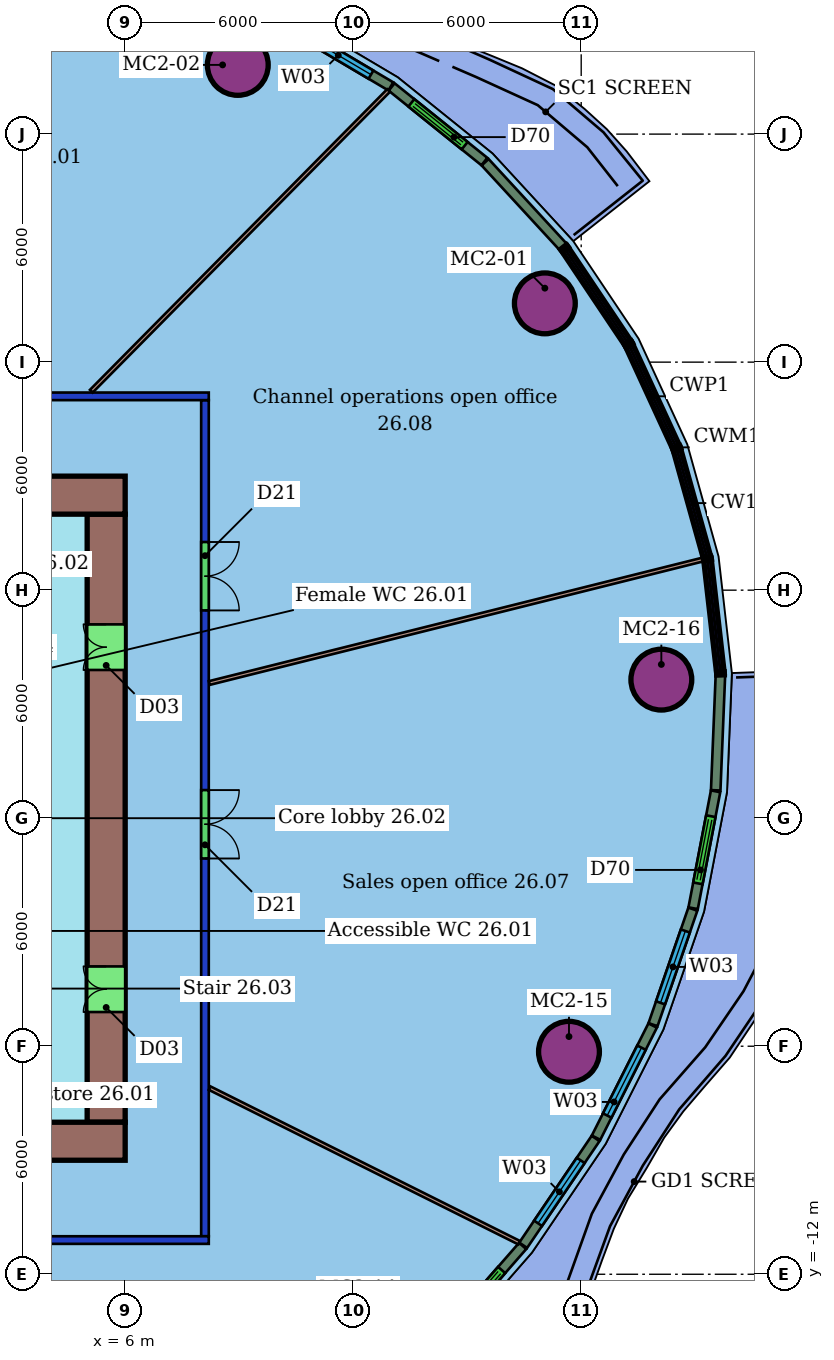
"""IFC4 building model, lengths in metres.
Left out: names, types, materials, properties, quantities, classifications, styles, units other than length and angle.
Written with IfcOpenShell. Run it as: python <this file> out.ifc"""

import sys

from ifc_helpers import new_model, si_unit, direction, frame, frame_2d, origin, origin_2d, place, context, subcontext, project, spatial, rectangle, hollow_circle, extrude, element, fill, save


model = new_model("IFC4")
c1 = context("Model", 3, precision=1e-05, world=origin(), true_north=direction((0.0, 1.0)))
c2 = subcontext(c1, "Body", "Model", "MODEL_VIEW")
j1 = project(units=[si_unit("LENGTHUNIT", "METRE"), si_unit("PLANEANGLEUNIT", "RADIAN")], contexts=[c1])
p1 = place(None, origin())
s1 = spatial("IfcSite", under=j1, at=p1, CompositionType="ELEMENT")
p2 = place(p1, origin())
s2 = spatial("IfcBuilding", under=s1, at=p2, CompositionType="ELEMENT")
p3 = place(p2, frame((0.0, 0.0, 113.8)))
s3 = spatial("IfcBuildingStorey", under=s2, at=p3, CompositionType="ELEMENT", Elevation=113.8)
for number, where, z_axis, x_axis in (
    (1, (17.043, 13.547, 0.0), (0.0, 0.0, 1.0), (1.0, 0.0, 0.0)),
    (2, (8.963, 19.821, 0.0), (0.0, 0.0, 1.0), (1.0, 0.0, 0.0)),
    (3, (17.679, -6.146, 0.0), (0.0, 0.0, 1.0), (1.0, 0.0, 0.0)),
    (4, (20.109, 3.646, 0.0), (0.0, 0.0, 1.0), (1.0, 0.0, 0.0)),
):
    element("IfcColumn", number, at=place(p3, frame(where, z_axis=z_axis, x_axis=x_axis)), inside=s3, PredefinedType="COLUMN", context=c2, shape_type="SweptSolid", body=[
        extrude(hollow_circle(Radius=0.8, WallThickness=0.055, at=origin_2d()), origin(), (0.0, 0.0, 1.0), 3.45),
    ])
p4 = place(p3, frame((8.2, -11.1, 0.0), z_axis=(0.0, 0.0, 1.0), x_axis=(-1.0, 0.0, 0.0)))
e5 = element("IfcWall", 5, at=p4, inside=s3, PredefinedType="PARTITIONING", context=c2, shape_type="SweptSolid", body=[
    extrude(rectangle(XDim=28.4, YDim=0.2, at=frame_2d((14.2, 0.0))), origin(), (0.0, 0.0, 1.0), 3.0),
])
p5 = place(p4, frame((19.015, 0.0, 0.0)))
e6 = element("IfcOpeningElement", 6, at=p5, cuts=e5, PredefinedType="OPENING", context=c2, shape_type="SweptSolid", body=[
    extrude(rectangle(XDim=1.8, YDim=2.1, at=frame_2d((0.9, 1.05))), frame((0.0, 0.11, 0.0), z_axis=(0.0, -1.0, 0.0), x_axis=(1.0, 0.0, 0.0)), (0.0, 0.0, 1.0), 0.22),
])
p6 = place(p4, frame((9.455, 0.0, 0.0)))
e7 = element("IfcOpeningElement", 7, at=p6, cuts=e5, PredefinedType="OPENING", context=c2, shape_type="SweptSolid", body=[
    extrude(rectangle(XDim=1.8, YDim=2.1, at=frame_2d((0.9, 1.05))), frame((0.0, 0.11, 0.0), z_axis=(0.0, -1.0, 0.0), x_axis=(1.0, 0.0, 0.0)), (0.0, 0.0, 1.0), 0.22),
])
p7 = place(p3, frame((-20.2, 11.1, 0.0), z_axis=(0.0, 0.0, 1.0), x_axis=(1.0, 0.0, 0.0)))
e8 = element("IfcWall", 8, at=p7, inside=s3, PredefinedType="PARTITIONING", context=c2, shape_type="SweptSolid", body=[
    extrude(rectangle(XDim=28.4, YDim=0.2, at=frame_2d((14.2, 0.0))), origin(), (0.0, 0.0, 1.0), 3.0),
])
p8 = place(p7, frame((20.417, 0.0, 0.0)))
e9 = element("IfcOpeningElement", 9, at=p8, cuts=e8, PredefinedType="OPENING", context=c2, shape_type="SweptSolid", body=[
    extrude(rectangle(XDim=1.8, YDim=2.1, at=frame_2d((0.9, 1.05))), frame((0.0, 0.11, 0.0), z_axis=(0.0, -1.0, 0.0), x_axis=(1.0, 0.0, 0.0)), (0.0, 0.0, 1.0), 0.22),
])
p9 = place(p7, frame((7.743, 0.0, 0.0)))
e10 = element("IfcOpeningElement", 10, at=p9, cuts=e8, PredefinedType="OPENING", context=c2, shape_type="SweptSolid", body=[
    extrude(rectangle(XDim=1.0, YDim=2.1, at=frame_2d((0.5, 1.05))), frame((0.0, 0.11, 0.0), z_axis=(0.0, -1.0, 0.0), x_axis=(1.0, 0.0, 0.0)), (0.0, 0.0, 1.0), 0.22),
])
p10 = place(p7, frame((2.867, 0.0, 0.0)))
e11 = element("IfcOpeningElement", 11, at=p10, cuts=e8, PredefinedType="OPENING", context=c2, shape_type="SweptSolid", body=[
    extrude(rectangle(XDim=1.0, YDim=2.4, at=frame_2d((0.5, 1.2))), frame((0.0, 0.11, 0.0), z_axis=(0.0, -1.0, 0.0), x_axis=(1.0, 0.0, 0.0)), (0.0, 0.0, 1.0), 0.22),
])
p11 = place(p3, frame((8.1, 11.0, 0.0), z_axis=(0.0, 0.0, 1.0), x_axis=(0.0, -1.0, 0.0)))
e12 = element("IfcWall", 12, at=p11, inside=s3, PredefinedType="PARTITIONING", context=c2, shape_type="SweptSolid", body=[
    extrude(rectangle(XDim=22.0, YDim=0.2, at=frame_2d((11.0, 0.0))), origin(), (0.0, 0.0, 1.0), 3.0),
])
p12 = place(p11, frame((10.26, 0.0, 0.0)))
e13 = element("IfcOpeningElement", 13, at=p12, cuts=e12, PredefinedType="OPENING", context=c2, shape_type="SweptSolid", body=[
    extrude(rectangle(XDim=1.8, YDim=2.1, at=frame_2d((0.9, 1.05))), frame((0.0, 0.11, 0.0), z_axis=(0.0, -1.0, 0.0), x_axis=(1.0, 0.0, 0.0)), (0.0, 0.0, 1.0), 0.22),
])
p13 = place(p11, frame((3.733, 0.0, 0.0)))
e14 = element("IfcOpeningElement", 14, at=p13, cuts=e12, PredefinedType="OPENING", context=c2, shape_type="SweptSolid", body=[
    extrude(rectangle(XDim=1.8, YDim=2.1, at=frame_2d((0.9, 1.05))), frame((0.0, 0.11, 0.0), z_axis=(0.0, -1.0, 0.0), x_axis=(1.0, 0.0, 0.0)), (0.0, 0.0, 1.0), 0.22),
])
p14 = place(p3, frame((12.93, 19.146, 0.0), z_axis=(0.0, 0.0, 1.0), x_axis=(-0.703090382433, -0.711100495099, 0.0)))
e15 = element("IfcWall", 15, at=p14, inside=s3, PredefinedType="PARTITIONING", context=c2, shape_type="SweptSolid", body=[
    extrude(rectangle(XDim=11.125, YDim=0.1, at=frame_2d((5.562, 0.0))), origin(), (0.0, 0.0, 1.0), 3.45),
])
p15 = place(p3, frame((16.368, -11.17, 0.0), z_axis=(0.0, 0.0, 1.0), x_axis=(-0.894652322712, 0.446763048457, 0.0)))
e16 = element("IfcWall", 16, at=p15, inside=s3, PredefinedType="PARTITIONING", context=c2, shape_type="SweptSolid", body=[
    extrude(rectangle(XDim=9.105, YDim=0.1, at=frame_2d((4.552, 0.0))), origin(), (0.0, 0.0, 1.0), 3.45),
])
p16 = place(p3, frame((21.198, 6.805, 0.0), z_axis=(0.0, 0.0, 1.0), x_axis=(-0.970095274977, -0.242724447608, 0.0)))
e17 = element("IfcWall", 17, at=p16, inside=s3, PredefinedType="PARTITIONING", context=c2, shape_type="SweptSolid", body=[
    extrude(rectangle(XDim=13.386, YDim=0.1, at=frame_2d((6.693, 0.0))), origin(), (0.0, 0.0, 1.0), 3.45),
])
p17 = place(p3, frame((17.52, 15.038, 0.0), z_axis=(0.0, 0.0, 1.0), x_axis=(-0.677632184293, 0.735400994567, 0.0)))
e18 = element("IfcWall", 18, at=p17, inside=s3, PredefinedType="SOLIDWALL", context=c2, shape_type="SweptSolid", body=[
    extrude(rectangle(XDim=3.022, YDim=0.25, at=frame_2d((1.511, 0.0))), origin(), (0.0, 0.0, 1.0), 3.05),
])
p18 = place(p3, frame((15.453, 17.278, 0.0), z_axis=(0.0, 0.0, 1.0), x_axis=(-0.779353281229, 0.626584761256, 0.0)))
e19 = element("IfcWall", 19, at=p18, inside=s3, PredefinedType="SOLIDWALL", context=c2, shape_type="SweptSolid", body=[
    extrude(rectangle(XDim=3.132, YDim=0.25, at=frame_2d((1.566, 0.0))), origin(), (0.0, 0.0, 1.0), 3.05),
])
p19 = place(p18, frame((0.666, 0.0, 0.0)))
e20 = element("IfcOpeningElement", 20, at=p19, cuts=e19, PredefinedType="OPENING", context=c2, shape_type="SweptSolid", body=[
    extrude(rectangle(XDim=1.8, YDim=2.4, at=frame_2d((0.9, 1.2))), frame((0.0, 0.135, 0.0), z_axis=(0.0, -1.0, 0.0), x_axis=(1.0, 0.0, 0.0)), (0.0, 0.0, 1.0), 0.27),
])
p20 = place(p3, frame((12.99, 19.255, 0.0), z_axis=(0.0, 0.0, 1.0), x_axis=(-0.860327301237, 0.509742027644, 0.0)))
e21 = element("IfcWall", 21, at=p20, inside=s3, PredefinedType="SOLIDWALL", context=c2, shape_type="SweptSolid", body=[
    extrude(rectangle(XDim=3.215, YDim=0.25, at=frame_2d((1.607, 0.0))), origin(), (0.0, 0.0, 1.0), 3.05),
])
p21 = place(p20, frame((0.607, 0.0, 0.9)))
e22 = element("IfcOpeningElement", 22, at=p21, cuts=e21, PredefinedType="OPENING", context=c2, shape_type="SweptSolid", body=[
    extrude(rectangle(XDim=2.0, YDim=2.1, at=frame_2d((1.0, 1.05))), frame((0.0, 0.135, 0.0), z_axis=(0.0, -1.0, 0.0), x_axis=(1.0, 0.0, 0.0)), (0.0, 0.0, 1.0), 0.27),
])
p22 = place(p3, frame((14.17, -13.876, 0.0), z_axis=(0.0, 0.0, 1.0), x_axis=(0.657903433386, 0.753102298721, 0.0)))
e23 = element("IfcWall", 23, at=p22, inside=s3, PredefinedType="SOLIDWALL", context=c2, shape_type="SweptSolid", body=[
    extrude(rectangle(XDim=3.48, YDim=0.25, at=frame_2d((1.74, 0.0))), origin(), (0.0, 0.0, 1.0), 3.05),
])
p23 = place(p22, frame((0.84, 0.0, 0.0)))
e24 = element("IfcOpeningElement", 24, at=p23, cuts=e23, PredefinedType="OPENING", context=c2, shape_type="SweptSolid", body=[
    extrude(rectangle(XDim=1.8, YDim=2.4, at=frame_2d((0.9, 1.2))), frame((0.0, 0.135, 0.0), z_axis=(0.0, -1.0, 0.0), x_axis=(1.0, 0.0, 0.0)), (0.0, 0.0, 1.0), 0.27),
])
p24 = place(p3, frame((16.473, -11.237, 0.0), z_axis=(0.0, 0.0, 1.0), x_axis=(0.561237624503, 0.827654715955, 0.0)))
e25 = element("IfcWall", 25, at=p24, inside=s3, PredefinedType="SOLIDWALL", context=c2, shape_type="SweptSolid", body=[
    extrude(rectangle(XDim=3.395, YDim=0.25, at=frame_2d((1.698, 0.0))), origin(), (0.0, 0.0, 1.0), 3.05),
])
p25 = place(p24, frame((0.698, 0.0, 0.9)))
e26 = element("IfcOpeningElement", 26, at=p25, cuts=e25, PredefinedType="OPENING", context=c2, shape_type="SweptSolid", body=[
    extrude(rectangle(XDim=2.0, YDim=2.1, at=frame_2d((1.0, 1.05))), frame((0.0, 0.135, 0.0), z_axis=(0.0, -1.0, 0.0), x_axis=(1.0, 0.0, 0.0)), (0.0, 0.0, 1.0), 0.27),
])
p26 = place(p3, frame((18.391, -8.406, 0.0), z_axis=(0.0, 0.0, 1.0), x_axis=(0.450638115992, 0.89270672027, 0.0)))
e27 = element("IfcWall", 27, at=p26, inside=s3, PredefinedType="SOLIDWALL", context=c2, shape_type="SweptSolid", body=[
    extrude(rectangle(XDim=3.305, YDim=0.25, at=frame_2d((1.652, 0.0))), origin(), (0.0, 0.0, 1.0), 3.05),
])
p27 = place(p26, frame((0.652, 0.0, 0.9)))
e28 = element("IfcOpeningElement", 28, at=p27, cuts=e27, PredefinedType="OPENING", context=c2, shape_type="SweptSolid", body=[
    extrude(rectangle(XDim=2.0, YDim=2.1, at=frame_2d((1.0, 1.05))), frame((0.0, 0.135, 0.0), z_axis=(0.0, -1.0, 0.0), x_axis=(1.0, 0.0, 0.0)), (0.0, 0.0, 1.0), 0.27),
])
p28 = place(p3, frame((19.89, -5.433, 0.0), z_axis=(0.0, 0.0, 1.0), x_axis=(0.326142792105, 0.945320516628, 0.0)))
e29 = element("IfcWall", 29, at=p28, inside=s3, PredefinedType="SOLIDWALL", context=c2, shape_type="SweptSolid", body=[
    extrude(rectangle(XDim=3.215, YDim=0.25, at=frame_2d((1.607, 0.0))), origin(), (0.0, 0.0, 1.0), 3.05),
])
p29 = place(p28, frame((0.607, 0.0, 0.9)))
e30 = element("IfcOpeningElement", 30, at=p29, cuts=e29, PredefinedType="OPENING", context=c2, shape_type="SweptSolid", body=[
    extrude(rectangle(XDim=2.0, YDim=2.1, at=frame_2d((1.0, 1.05))), frame((0.0, 0.135, 0.0), z_axis=(0.0, -1.0, 0.0), x_axis=(1.0, 0.0, 0.0)), (0.0, 0.0, 1.0), 0.27),
])
p30 = place(p3, frame((20.945, -2.368, 0.0), z_axis=(0.0, 0.0, 1.0), x_axis=(0.188780901571, 0.982019231585, 0.0)))
e31 = element("IfcWall", 31, at=p30, inside=s3, PredefinedType="SOLIDWALL", context=c2, shape_type="SweptSolid", body=[
    extrude(rectangle(XDim=3.132, YDim=0.25, at=frame_2d((1.566, 0.0))), origin(), (0.0, 0.0, 1.0), 3.05),
])
p31 = place(p30, frame((0.666, 0.0, 0.0)))
e32 = element("IfcOpeningElement", 32, at=p31, cuts=e31, PredefinedType="OPENING", context=c2, shape_type="SweptSolid", body=[
    extrude(rectangle(XDim=1.8, YDim=2.4, at=frame_2d((0.9, 1.2))), frame((0.0, 0.135, 0.0), z_axis=(0.0, -1.0, 0.0), x_axis=(1.0, 0.0, 0.0)), (0.0, 0.0, 1.0), 0.27),
])
p32 = place(p3, frame((21.539, 0.734, 0.0), z_axis=(0.0, 0.0, 1.0), x_axis=(0.04088113468, 0.99916401698, 0.0)))
e33 = element("IfcWall", 33, at=p32, inside=s3, PredefinedType="SOLIDWALL", context=c2, shape_type="SweptSolid", body=[
    extrude(rectangle(XDim=3.022, YDim=0.25, at=frame_2d((1.511, 0.0))), origin(), (0.0, 0.0, 1.0), 3.05),
])
p33 = place(p3, frame((6.0, 8.5, 0.0), z_axis=(0.0, 0.0, 1.0), x_axis=(-1.0, 0.0, 0.0)))
e34 = element("IfcWall", 34, at=p33, inside=s3, PredefinedType="SHEAR", context=c2, shape_type="SweptSolid", body=[
    extrude(rectangle(XDim=12.0, YDim=1.0, at=frame_2d((6.0, 0.0))), origin(), (0.0, 0.0, 1.0), 3.3),
])
p34 = place(p33, frame((5.6, 0.0, 0.0)))
e35 = element("IfcOpeningElement", 35, at=p34, cuts=e34, PredefinedType="OPENING", context=c2, shape_type="SweptSolid", body=[
    extrude(rectangle(XDim=1.2, YDim=2.1, at=frame_2d((0.6, 1.05))), frame((0.0, 0.51, 0.0), z_axis=(0.0, -1.0, 0.0), x_axis=(1.0, 0.0, 0.0)), (0.0, 0.0, 1.0), 1.02),
])
p35 = place(p3, frame((-18.0, -8.5, 0.0), z_axis=(0.0, 0.0, 1.0), x_axis=(1.0, 0.0, 0.0)))
e36 = element("IfcWall", 36, at=p35, inside=s3, PredefinedType="SHEAR", context=c2, shape_type="SweptSolid", body=[
    extrude(rectangle(XDim=24.0, YDim=1.0, at=frame_2d((12.0, 0.0))), origin(), (0.0, 0.0, 1.0), 3.3),
])
p36 = place(p35, frame((6.0, 0.0, 0.0)))
e37 = element("IfcOpeningElement", 37, at=p36, cuts=e36, PredefinedType="OPENING", context=c2, shape_type="SweptSolid", body=[
    extrude(rectangle(XDim=1.2, YDim=2.1, at=frame_2d((0.6, 1.05))), frame((0.0, 0.51, 0.0), z_axis=(0.0, -1.0, 0.0), x_axis=(1.0, 0.0, 0.0)), (0.0, 0.0, 1.0), 1.02),
])
p37 = place(p3, frame((5.5, -8.0, 0.0), z_axis=(0.0, 0.0, 1.0), x_axis=(0.0, 1.0, 0.0)))
e38 = element("IfcWall", 38, at=p37, inside=s3, PredefinedType="SHEAR", context=c2, shape_type="SweptSolid", body=[
    extrude(rectangle(XDim=16.0, YDim=1.0, at=frame_2d((8.0, 0.0))), origin(), (0.0, 0.0, 1.0), 3.3),
])
p38 = place(p37, frame((2.9, 0.0, 0.0)))
e39 = element("IfcOpeningElement", 39, at=p38, cuts=e38, PredefinedType="OPENING", context=c2, shape_type="SweptSolid", body=[
    extrude(rectangle(XDim=1.2, YDim=2.1, at=frame_2d((0.6, 1.05))), frame((0.0, 0.51, 0.0), z_axis=(0.0, -1.0, 0.0), x_axis=(1.0, 0.0, 0.0)), (0.0, 0.0, 1.0), 1.02),
])
p39 = place(p37, frame((11.9, 0.0, 0.0)))
e40 = element("IfcOpeningElement", 40, at=p39, cuts=e38, PredefinedType="OPENING", context=c2, shape_type="SweptSolid", body=[
    extrude(rectangle(XDim=1.2, YDim=2.1, at=frame_2d((0.6, 1.05))), frame((0.0, 0.51, 0.0), z_axis=(0.0, -1.0, 0.0), x_axis=(1.0, 0.0, 0.0)), (0.0, 0.0, 1.0), 1.02),
])
p40 = place(p12, origin())
e41 = element("IfcDoor", 41, at=p40, inside=s3, OperationType="DOUBLE_DOOR_SINGLE_SWING", PredefinedType="DOOR", context=c2, shape_type="SweptSolid", body=[
    extrude(rectangle(XDim=1.8, YDim=2.1, at=frame_2d((0.9, 1.05))), frame((0.0, 0.025, 0.0), z_axis=(0.0, -1.0, 0.0), x_axis=(1.0, 0.0, 0.0)), (0.0, 0.0, 1.0), 0.05),
])
fill(e13, e41)
p41 = place(p13, origin())
e42 = element("IfcDoor", 42, at=p41, inside=s3, OperationType="DOUBLE_DOOR_SINGLE_SWING", PredefinedType="DOOR", context=c2, shape_type="SweptSolid", body=[
    extrude(rectangle(XDim=1.8, YDim=2.1, at=frame_2d((0.9, 1.05))), frame((0.0, 0.025, 0.0), z_axis=(0.0, -1.0, 0.0), x_axis=(1.0, 0.0, 0.0)), (0.0, 0.0, 1.0), 0.05),
])
fill(e14, e42)
p42 = place(p19, origin())
e43 = element("IfcDoor", 43, at=p42, inside=s3, OperationType="DOUBLE_DOOR_SLIDING", PredefinedType="DOOR", context=c2, shape_type="SweptSolid", body=[
    extrude(rectangle(XDim=1.8, YDim=2.4, at=frame_2d((0.9, 1.2))), frame((0.0, 0.025, 0.0), z_axis=(0.0, -1.0, 0.0), x_axis=(1.0, 0.0, 0.0)), (0.0, 0.0, 1.0), 0.05),
])
fill(e20, e43)
p43 = place(p21, origin())
e44 = element("IfcWindow", 44, at=p43, inside=s3, PartitioningType="SINGLE_PANEL", PredefinedType="WINDOW", context=c2, shape_type="SweptSolid", body=[
    extrude(rectangle(XDim=2.0, YDim=2.1, at=frame_2d((1.0, 1.05))), frame((0.0, 0.03, 0.0), z_axis=(0.0, -1.0, 0.0), x_axis=(1.0, 0.0, 0.0)), (0.0, 0.0, 1.0), 0.06),
])
fill(e22, e44)
p44 = place(p23, origin())
e45 = element("IfcDoor", 45, at=p44, inside=s3, OperationType="DOUBLE_DOOR_SLIDING", PredefinedType="DOOR", context=c2, shape_type="SweptSolid", body=[
    extrude(rectangle(XDim=1.8, YDim=2.4, at=frame_2d((0.9, 1.2))), frame((0.0, 0.025, 0.0), z_axis=(0.0, -1.0, 0.0), x_axis=(1.0, 0.0, 0.0)), (0.0, 0.0, 1.0), 0.05),
])
fill(e24, e45)
p45 = place(p25, origin())
e46 = element("IfcWindow", 46, at=p45, inside=s3, PartitioningType="SINGLE_PANEL", PredefinedType="WINDOW", context=c2, shape_type="SweptSolid", body=[
    extrude(rectangle(XDim=2.0, YDim=2.1, at=frame_2d((1.0, 1.05))), frame((0.0, 0.03, 0.0), z_axis=(0.0, -1.0, 0.0), x_axis=(1.0, 0.0, 0.0)), (0.0, 0.0, 1.0), 0.06),
])
fill(e26, e46)
p46 = place(p27, origin())
e47 = element("IfcWindow", 47, at=p46, inside=s3, PartitioningType="SINGLE_PANEL", PredefinedType="WINDOW", context=c2, shape_type="SweptSolid", body=[
    extrude(rectangle(XDim=2.0, YDim=2.1, at=frame_2d((1.0, 1.05))), frame((0.0, 0.03, 0.0), z_axis=(0.0, -1.0, 0.0), x_axis=(1.0, 0.0, 0.0)), (0.0, 0.0, 1.0), 0.06),
])
fill(e28, e47)
p47 = place(p29, origin())
e48 = element("IfcWindow", 48, at=p47, inside=s3, PartitioningType="SINGLE_PANEL", PredefinedType="WINDOW", context=c2, shape_type="SweptSolid", body=[
    extrude(rectangle(XDim=2.0, YDim=2.1, at=frame_2d((1.0, 1.05))), frame((0.0, 0.03, 0.0), z_axis=(0.0, -1.0, 0.0), x_axis=(1.0, 0.0, 0.0)), (0.0, 0.0, 1.0), 0.06),
])
fill(e30, e48)
p48 = place(p31, origin())
e49 = element("IfcDoor", 49, at=p48, inside=s3, OperationType="DOUBLE_DOOR_SLIDING", PredefinedType="DOOR", context=c2, shape_type="SweptSolid", body=[
    extrude(rectangle(XDim=1.8, YDim=2.4, at=frame_2d((0.9, 1.2))), frame((0.0, 0.025, 0.0), z_axis=(0.0, -1.0, 0.0), x_axis=(1.0, 0.0, 0.0)), (0.0, 0.0, 1.0), 0.05),
])
fill(e32, e49)
p49 = place(p38, origin())
e50 = element("IfcDoor", 50, at=p49, inside=s3, OperationType="DOUBLE_DOOR_SINGLE_SWING", PredefinedType="NOTDEFINED", context=c2, shape_type="SweptSolid", body=[
    extrude(rectangle(XDim=1.2, YDim=2.1, at=frame_2d((0.6, 1.05))), frame((0.0, 0.025, 0.0), z_axis=(0.0, -1.0, 0.0), x_axis=(1.0, 0.0, 0.0)), (0.0, 0.0, 1.0), 0.05),
])
fill(e39, e50)
p50 = place(p39, origin())
e51 = element("IfcDoor", 51, at=p50, inside=s3, OperationType="DOUBLE_DOOR_SINGLE_SWING", PredefinedType="NOTDEFINED", context=c2, shape_type="SweptSolid", body=[
    extrude(rectangle(XDim=1.2, YDim=2.1, at=frame_2d((0.6, 1.05))), frame((0.0, 0.025, 0.0), z_axis=(0.0, -1.0, 0.0), x_axis=(1.0, 0.0, 0.0)), (0.0, 0.0, 1.0), 0.05),
])
fill(e40, e51)
save(model, sys.argv[1])
